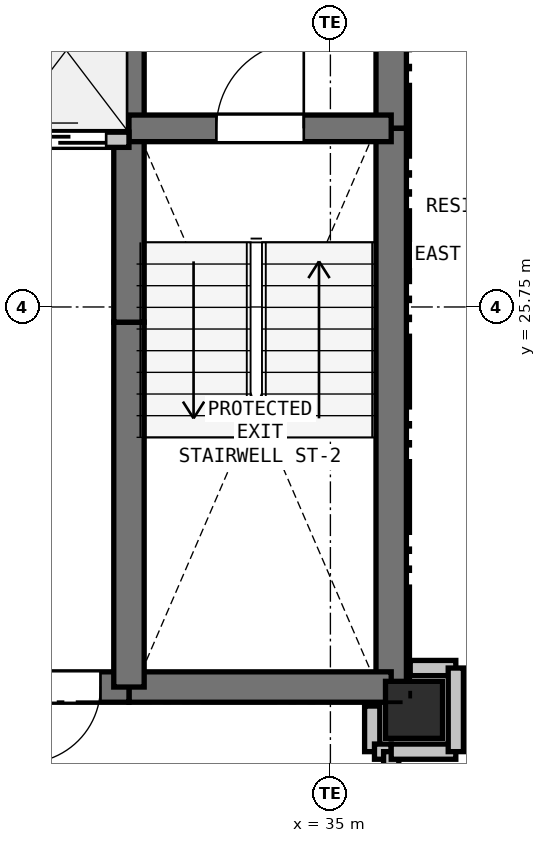
"""IFC4 building model, lengths in metres.
Left out: names, types, materials, properties, quantities, classifications, styles, units other than length and angle.
Written with IfcOpenShell. Run it as: python <this file> out.ifc"""

import sys

from ifc_helpers import new_model, si_unit, direction, frame, frame_2d, origin, origin_2d, place, context, subcontext, project, spatial, rectangle, extrude, element, fill, save


model = new_model("IFC4")
c1 = context("Model", 3, precision=1e-05, world=origin(), true_north=direction((0.0, 1.0)))
c2 = subcontext(c1, "Body", "Model", "MODEL_VIEW")
j1 = project(units=[si_unit("LENGTHUNIT", "METRE"), si_unit("PLANEANGLEUNIT", "RADIAN")], contexts=[c1])
p1 = place(None, origin())
s1 = spatial("IfcSite", under=j1, at=p1, CompositionType="ELEMENT")
p2 = place(p1, origin())
s2 = spatial("IfcBuilding", under=s1, at=p2, CompositionType="ELEMENT")
p3 = place(p2, frame((0.0, 0.0, 96.6)))
s3 = spatial("IfcBuildingStorey", under=s2, at=p3, CompositionType="ELEMENT", Elevation=96.6)
p4 = place(p3, frame((36.1, 20.45, 0.0), z_axis=(0.0, 0.0, 1.0), x_axis=(1.0, 0.0, 0.0)))
e1 = element("IfcColumn", 1, at=p4, inside=s3, PredefinedType="COLUMN", context=c2, shape_type="SweptSolid", body=[
    extrude(rectangle(XDim=0.75, YDim=0.75, at=origin_2d()), origin(), (0.0, 0.0, 1.0), 3.3),
])
p5 = place(p3, frame((35.8, 32.75, 0.0), z_axis=(0.0, 0.0, 1.0), x_axis=(0.0, -1.0, 0.0)))
e2 = element("IfcWall", 2, at=p5, inside=s3, PredefinedType="SHEAR", context=c2, shape_type="SweptSolid", body=[
    extrude(rectangle(XDim=4.65, YDim=0.4, at=frame_2d((2.325, 0.0))), origin(), (0.0, 0.0, 1.0), 3.05),
])
p6 = place(p3, frame((35.8, 28.1, 0.0), z_axis=(0.0, 0.0, 1.0), x_axis=(0.0, -1.0, 0.0)))
e3 = element("IfcWall", 3, at=p6, inside=s3, PredefinedType="SHEAR", context=c2, shape_type="SweptSolid", body=[
    extrude(rectangle(XDim=7.35, YDim=0.4, at=frame_2d((3.675, 0.0))), origin(), (0.0, 0.0, 1.0), 3.05),
])
p7 = place(p3, frame((35.8, 20.75, 0.0), z_axis=(0.0, 0.0, 1.0), x_axis=(-1.0, 0.0, 0.0)))
e4 = element("IfcWall", 4, at=p7, inside=s3, PredefinedType="SHEAR", context=c2, shape_type="SweptSolid", body=[
    extrude(rectangle(XDim=3.45, YDim=0.4, at=frame_2d((1.725, 0.0))), origin(), (0.0, 0.0, 1.0), 3.05),
])
p8 = place(p3, frame((32.35, 20.75, 0.0), z_axis=(0.0, 0.0, 1.0), x_axis=(-1.0, 0.0, 0.0)))
e5 = element("IfcWall", 5, at=p8, inside=s3, PredefinedType="SHEAR", context=c2, shape_type="SweptSolid", body=[
    extrude(rectangle(XDim=1.75, YDim=0.4, at=frame_2d((0.875, 0.0))), origin(), (0.0, 0.0, 1.0), 3.05),
])
p9 = place(p8, frame((0.375, 0.0, 0.0)))
e6 = element("IfcOpeningElement", 6, at=p9, cuts=e5, PredefinedType="OPENING", context=c2, shape_type="SweptSolid", body=[
    extrude(rectangle(XDim=1.0, YDim=2.15, at=frame_2d((0.5, 1.075))), frame((0.0, 0.21, 0.0), z_axis=(0.0, -1.0, 0.0), x_axis=(1.0, 0.0, 0.0)), (0.0, 0.0, 1.0), 0.42),
])
p10 = place(p3, frame((32.35, 20.75, 0.0), z_axis=(0.0, 0.0, 1.0), x_axis=(0.0, 1.0, 0.0)))
e7 = element("IfcWall", 7, at=p10, inside=s3, PredefinedType="SHEAR", context=c2, shape_type="SweptSolid", body=[
    extrude(rectangle(XDim=4.8, YDim=0.4, at=frame_2d((2.4, 0.0))), origin(), (0.0, 0.0, 1.0), 3.05),
])
p11 = place(p3, frame((32.35, 25.55, 0.0), z_axis=(0.0, 0.0, 1.0), x_axis=(0.0, 1.0, 0.0)))
e8 = element("IfcWall", 8, at=p11, inside=s3, PredefinedType="SHEAR", context=c2, shape_type="SweptSolid", body=[
    extrude(rectangle(XDim=2.4, YDim=0.4, at=frame_2d((1.2, 0.0))), origin(), (0.0, 0.0, 1.0), 3.05),
])
p12 = place(p3, frame((32.35, 27.95, 0.0), z_axis=(0.0, 0.0, 1.0), x_axis=(0.0, 1.0, 0.0)))
e9 = element("IfcWall", 9, at=p12, inside=s3, PredefinedType="SHEAR", context=c2, shape_type="SweptSolid", body=[
    extrude(rectangle(XDim=2.8, YDim=0.4, at=frame_2d((1.4, 0.0))), origin(), (0.0, 0.0, 1.0), 3.05),
])
p13 = place(p3, frame((32.35, 28.1, 0.0), z_axis=(0.0, 0.0, 1.0), x_axis=(1.0, 0.0, 0.0)))
e10 = element("IfcWall", 10, at=p13, inside=s3, PredefinedType="SHEAR", context=c2, shape_type="SweptSolid", body=[
    extrude(rectangle(XDim=3.45, YDim=0.35, at=frame_2d((1.725, 0.0))), origin(), (0.0, 0.0, 1.0), 3.05),
])
p14 = place(p13, frame((1.15, 0.0, 0.0)))
e11 = element("IfcOpeningElement", 11, at=p14, cuts=e10, PredefinedType="OPENING", context=c2, shape_type="SweptSolid", body=[
    extrude(rectangle(XDim=1.15, YDim=2.15, at=frame_2d((0.575, 1.075))), frame((0.0, 0.185, 0.0), z_axis=(0.0, -1.0, 0.0), x_axis=(1.0, 0.0, 0.0)), (0.0, 0.0, 1.0), 0.37),
])
p15 = place(p3, frame((27.4, 27.95, 0.0), z_axis=(0.0, 0.0, 1.0), x_axis=(1.0, 0.0, 0.0)))
e12 = element("IfcWall", 12, at=p15, inside=s3, PredefinedType="PARTITIONING", context=c2, shape_type="SweptSolid", body=[
    extrude(rectangle(XDim=4.95, YDim=0.2, at=frame_2d((2.475, 0.0))), origin(), (0.0, 0.0, 1.0), 3.05),
])
p16 = place(p15, frame((0.25, 0.0, 0.0)))
e13 = element("IfcOpeningElement", 13, at=p16, cuts=e12, PredefinedType="OPENING", context=c2, shape_type="SweptSolid", body=[
    extrude(rectangle(XDim=1.1, YDim=2.15, at=frame_2d((0.55, 1.075))), frame((0.0, 0.11, 0.0), z_axis=(0.0, -1.0, 0.0), x_axis=(1.0, 0.0, 0.0)), (0.0, 0.0, 1.0), 0.22),
])
p17 = place(p15, frame((1.9, 0.0, 0.0)))
e14 = element("IfcOpeningElement", 14, at=p17, cuts=e12, PredefinedType="OPENING", context=c2, shape_type="SweptSolid", body=[
    extrude(rectangle(XDim=1.1, YDim=2.15, at=frame_2d((0.55, 1.075))), frame((0.0, 0.11, 0.0), z_axis=(0.0, -1.0, 0.0), x_axis=(1.0, 0.0, 0.0)), (0.0, 0.0, 1.0), 0.22),
])
p18 = place(p15, frame((3.55, 0.0, 0.0)))
e15 = element("IfcOpeningElement", 15, at=p18, cuts=e12, PredefinedType="OPENING", context=c2, shape_type="SweptSolid", body=[
    extrude(rectangle(XDim=1.1, YDim=2.15, at=frame_2d((0.55, 1.075))), frame((0.0, 0.11, 0.0), z_axis=(0.0, -1.0, 0.0), x_axis=(1.0, 0.0, 0.0)), (0.0, 0.0, 1.0), 0.22),
])
p19 = place(p3, frame((35.55, 20.5, 0.0), z_axis=(0.0, 0.0, 1.0), x_axis=(0.0, -1.0, 0.0)))
e16 = element("IfcWall", 16, at=p19, inside=s3, PredefinedType="PARTITIONING", context=c2, shape_type="SweptSolid", body=[
    extrude(rectangle(XDim=0.6, YDim=0.2, at=frame_2d((0.3, 0.0))), origin(), (0.0, 0.0, 1.0), 2.498),
])
p20 = place(p3, frame((35.58, 19.9, 0.0), z_axis=(0.0, 0.0, 1.0), x_axis=(1.0, 0.0, 0.0)))
e17 = element("IfcWall", 17, at=p20, inside=s3, PredefinedType="PARTITIONING", context=c2, shape_type="SweptSolid", body=[
    extrude(rectangle(XDim=0.22, YDim=0.2, at=frame_2d((0.11, 0.0))), origin(), (0.0, 0.0, 1.0), 3.05),
])
p21 = place(p3, frame((35.8, 19.9, 0.0), z_axis=(0.0, 0.0, 1.0), x_axis=(0.0, -1.0, 0.0)))
e18 = element("IfcWall", 18, at=p21, inside=s3, PredefinedType="PARTITIONING", context=c2, shape_type="SweptSolid", body=[
    extrude(rectangle(XDim=1.75, YDim=0.2, at=frame_2d((0.875, 0.0))), origin(), (0.0, 0.0, 1.0), 3.05),
])
p22 = place(p21, frame((0.375, 0.0, 0.0)))
e19 = element("IfcOpeningElement", 19, at=p22, cuts=e18, PredefinedType="OPENING", context=c2, shape_type="SweptSolid", body=[
    extrude(rectangle(XDim=1.0, YDim=2.15, at=frame_2d((0.5, 1.075))), frame((0.0, 0.11, 0.0), z_axis=(0.0, -1.0, 0.0), x_axis=(1.0, 0.0, 0.0)), (0.0, 0.0, 1.0), 0.22),
])
p23 = place(p3, frame((36.65, 21.0, 0.0), z_axis=(0.0, 0.0, 1.0), x_axis=(-1.0, 0.0, 0.0)))
e20 = element("IfcWall", 20, at=p23, inside=s3, PredefinedType="PARTITIONING", context=c2, shape_type="SweptSolid", body=[
    extrude(rectangle(XDim=0.6, YDim=0.2, at=frame_2d((0.3, 0.0))), origin(), (0.0, 0.0, 1.0), 2.498),
])
p24 = place(p3, frame((35.8, 19.9, 0.0), z_axis=(0.0, 0.0, 1.0), x_axis=(1.0, 0.0, 0.0)))
e21 = element("IfcWall", 21, at=p24, inside=s3, PredefinedType="PARTITIONING", context=c2, shape_type="SweptSolid", body=[
    extrude(rectangle(XDim=0.85, YDim=0.2, at=frame_2d((0.425, 0.0))), origin(), (0.0, 0.0, 1.0), 2.423),
])
p25 = place(p3, frame((36.65, 19.9, 0.0), z_axis=(0.0, 0.0, 1.0), x_axis=(0.0, 1.0, 0.0)))
e22 = element("IfcWall", 22, at=p25, inside=s3, PredefinedType="PARTITIONING", context=c2, shape_type="SweptSolid", body=[
    extrude(rectangle(XDim=1.1, YDim=0.2, at=frame_2d((0.55, 0.0))), origin(), (0.0, 0.0, 1.0), 3.05),
])
p26 = place(p18, origin())
e23 = element("IfcDoor", 23, at=p26, inside=s3, OperationType="SLIDING_TO_LEFT", PredefinedType="DOOR", context=c2, shape_type="SweptSolid", body=[
    extrude(rectangle(XDim=1.1, YDim=2.15, at=frame_2d((0.55, 1.075))), frame((0.0, 0.025, 0.0), z_axis=(0.0, -1.0, 0.0), x_axis=(1.0, 0.0, 0.0)), (0.0, 0.0, 1.0), 0.05),
])
fill(e15, e23)
p27 = place(p9, origin())
e24 = element("IfcDoor", 24, at=p27, inside=s3, OperationType="SINGLE_SWING_RIGHT", PredefinedType="DOOR", context=c2, shape_type="SweptSolid", body=[
    extrude(rectangle(XDim=1.0, YDim=2.15, at=frame_2d((0.5, 1.075))), frame((0.0, 0.025, 0.0), z_axis=(0.0, -1.0, 0.0), x_axis=(1.0, 0.0, 0.0)), (0.0, 0.0, 1.0), 0.05),
])
fill(e6, e24)
p28 = place(p14, origin())
e25 = element("IfcDoor", 25, at=p28, inside=s3, OperationType="SINGLE_SWING_RIGHT", PredefinedType="DOOR", context=c2, shape_type="SweptSolid", body=[
    extrude(rectangle(XDim=1.15, YDim=2.15, at=frame_2d((0.575, 1.075))), frame((0.0, 0.025, 0.0), z_axis=(0.0, -1.0, 0.0), x_axis=(1.0, 0.0, 0.0)), (0.0, 0.0, 1.0), 0.05),
])
fill(e11, e25)
save(model, sys.argv[1])
